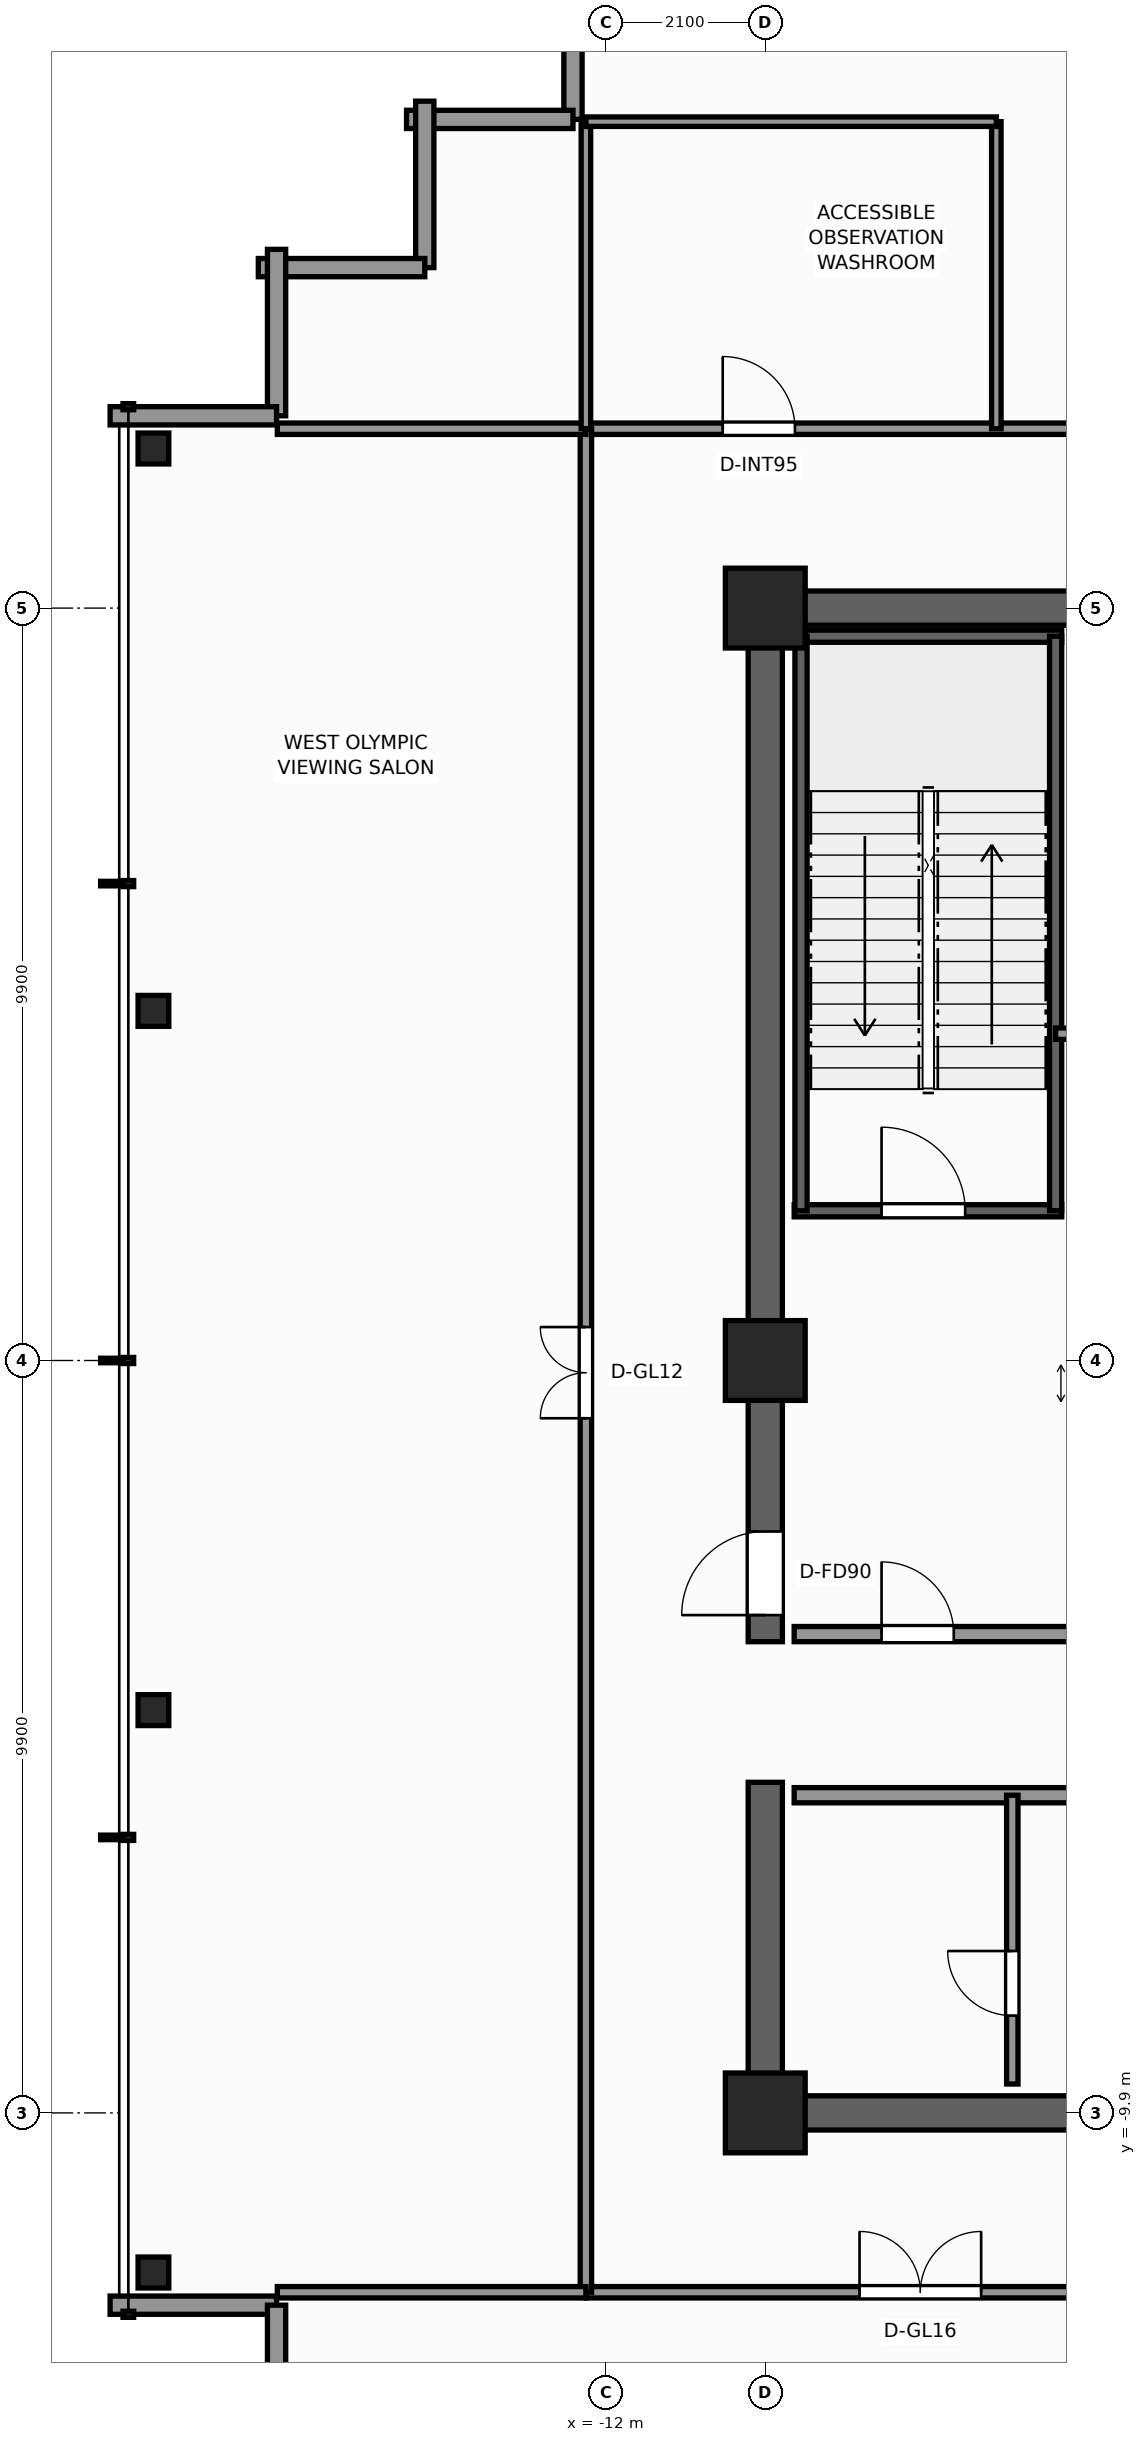
"""IFC4 building model, lengths in metres.
Left out: names, types, materials, properties, quantities, classifications, styles, units other than length and angle.
Written with IfcOpenShell. Run it as: python <this file> out.ifc"""

import sys

from ifc_helpers import new_model, si_unit, direction, frame, frame_2d, origin, origin_2d, place, context, subcontext, project, spatial, rectangle, i_section, extrude, element, fill, save


model = new_model("IFC4")
c1 = context("Model", 3, precision=1e-05, world=origin(), true_north=direction((0.0, 1.0)))
c2 = subcontext(c1, "Body", "Model", "MODEL_VIEW")
j1 = project(units=[si_unit("LENGTHUNIT", "METRE"), si_unit("PLANEANGLEUNIT", "RADIAN")], contexts=[c1])
p1 = place(None, origin())
s1 = spatial("IfcSite", under=j1, at=p1, CompositionType="ELEMENT")
p2 = place(p1, origin())
s2 = spatial("IfcBuilding", under=s1, at=p2, CompositionType="ELEMENT")
p3 = place(p2, frame((0.0, 0.0, 267.4)))
s3 = spatial("IfcBuildingStorey", under=s2, at=p3, CompositionType="ELEMENT", Elevation=267.4)
p4 = place(p3, frame((-3.54, -9.9, 0.0), z_axis=(0.0, 0.0, 1.0), x_axis=(-1.0, 0.0, 0.0)))
e1 = element("IfcWall", 1, at=p4, inside=s3, PredefinedType="SHEAR", context=c2, shape_type="SweptSolid", body=[
    extrude(rectangle(XDim=6.585, YDim=0.45, at=frame_2d((3.292, 0.0))), origin(), (0.0, 0.0, 1.0), 5.0),
])
p5 = place(p3, frame((-10.125, 9.9, 0.0), z_axis=(0.0, 0.0, 1.0), x_axis=(1.0, 0.0, 0.0)))
e2 = element("IfcWall", 2, at=p5, inside=s3, PredefinedType="SHEAR", context=c2, shape_type="SweptSolid", body=[
    extrude(rectangle(XDim=14.545, YDim=0.45, at=frame_2d((7.272, 0.0))), origin(), (0.0, 0.0, 1.0), 5.0),
])
p6 = place(p3, frame((-9.9, -9.675, 0.0), z_axis=(0.0, 0.0, 1.0), x_axis=(0.0, 1.0, 0.0)))
e3 = element("IfcWall", 3, at=p6, inside=s3, PredefinedType="SHEAR", context=c2, shape_type="SweptSolid", body=[
    extrude(rectangle(XDim=4.125, YDim=0.45, at=frame_2d((2.062, 0.0))), origin(), (0.0, 0.0, 1.0), 5.0),
])
p7 = place(p3, frame((-9.9, -3.7, 0.0), z_axis=(0.0, 0.0, 1.0), x_axis=(0.0, 1.0, 0.0)))
e4 = element("IfcWall", 4, at=p7, inside=s3, PredefinedType="SHEAR", context=c2, shape_type="SweptSolid", body=[
    extrude(rectangle(XDim=13.375, YDim=0.45, at=frame_2d((6.688, 0.0))), origin(), (0.0, 0.0, 1.0), 5.0),
])
p8 = place(p7, frame((0.35, 0.0, 0.0)))
e5 = element("IfcOpeningElement", 5, at=p8, cuts=e4, PredefinedType="OPENING", context=c2, shape_type="SweptSolid", body=[
    extrude(rectangle(XDim=1.1, YDim=2.2, at=frame_2d((0.55, 1.1))), frame((0.0, 0.235, 0.0), z_axis=(0.0, -1.0, 0.0), x_axis=(1.0, 0.0, 0.0)), (0.0, 0.0, 1.0), 0.47),
])
for number, where, z_axis, x_axis in (
    (6, (-9.9, -9.9, 0.0), (0.0, 0.0, 1.0), (1.0, 0.0, 0.0)),
    (7, (-9.9, 9.9, 0.0), (0.0, 0.0, 1.0), (1.0, 0.0, 0.0)),
    (8, (-9.9, 0.0, 0.0), (0.0, 0.0, 1.0), (1.0, 0.0, 0.0)),
):
    element("IfcColumn", number, at=place(p3, frame(where, z_axis=z_axis, x_axis=x_axis)), inside=s3, PredefinedType="COLUMN", context=c2, shape_type="SweptSolid", body=[
        extrude(rectangle(XDim=1.05, YDim=1.05, at=origin_2d()), origin(), (0.0, 0.0, 1.0), 5.0),
    ])
for number, where, z_axis, x_axis in (
    (9, (-17.95, -12.0, 0.0), (0.0, 0.0, 1.0), (1.0, 0.0, 0.0)),
    (10, (-17.95, -4.6, 0.0), (0.0, 0.0, 1.0), (1.0, 0.0, 0.0)),
    (11, (-17.95, 4.6, 0.0), (0.0, 0.0, 1.0), (1.0, 0.0, 0.0)),
    (12, (-17.95, 12.0, 0.0), (0.0, 0.0, 1.0), (1.0, 0.0, 0.0)),
):
    element("IfcColumn", number, at=place(p3, frame(where, z_axis=z_axis, x_axis=x_axis)), inside=s3, PredefinedType="COLUMN", context=c2, shape_type="SweptSolid", body=[
        extrude(i_section(OverallWidth=0.404, OverallDepth=0.407, WebThickness=0.027, FlangeThickness=0.044, FilletRadius=0.025, at=origin_2d()), origin(), (0.0, 0.0, 1.0), 5.0),
    ])
p9 = place(p3, frame((-12.43, 16.33, 0.0), z_axis=(0.0, 0.0, 1.0), x_axis=(0.0, 1.0, 0.0)))
e13 = element("IfcWall", 13, at=p9, inside=s3, PredefinedType="STANDARD", context=c2, shape_type="SweptSolid", body=[
    extrude(rectangle(XDim=2.19, YDim=0.24, at=frame_2d((1.095, 0.0))), origin(), (0.0, 0.0, 1.0), 4.083),
])
for number, where, z_axis, x_axis in (
    (14, (-14.62, 16.33, 0.0), (0.0, 0.0, 1.0), (1.0, 0.0, 0.0)),
    (15, (-14.38, 14.38, 0.0), (0.0, 0.0, 1.0), (0.0, 1.0, 0.0)),
    (16, (-16.57, 14.38, 0.0), (0.0, 0.0, 1.0), (1.0, 0.0, 0.0)),
    (17, (-16.33, 12.43, 0.0), (0.0, 0.0, 1.0), (0.0, 1.0, 0.0)),
):
    element("IfcWall", number, at=place(p3, frame(where, z_axis=z_axis, x_axis=x_axis)), inside=s3, PredefinedType="STANDARD", context=c2, shape_type="SweptSolid", body=[
        extrude(rectangle(XDim=2.19, YDim=0.24, at=frame_2d((1.095, 0.0))), origin(), (0.0, 0.0, 1.0), 4.083),
    ])
for number, where, z_axis, x_axis in (
    (18, (-18.52, 12.43, 0.0), (0.0, 0.0, 1.0), (1.0, 0.0, 0.0)),
    (19, (-16.33, -12.43, 0.0), (0.0, 0.0, 1.0), (-1.0, 0.0, 0.0)),
):
    element("IfcWall", number, at=place(p3, frame(where, z_axis=z_axis, x_axis=x_axis)), inside=s3, PredefinedType="STANDARD", context=c2, shape_type="SweptSolid", body=[
        extrude(rectangle(XDim=2.19, YDim=0.24, at=frame_2d((1.095, 0.0))), origin(), (0.0, 0.0, 1.0), 4.083),
    ])
p10 = place(p3, frame((-16.33, -14.62, 0.0), z_axis=(0.0, 0.0, 1.0), x_axis=(0.0, 1.0, 0.0)))
e20 = element("IfcWall", 20, at=p10, inside=s3, PredefinedType="STANDARD", context=c2, shape_type="SweptSolid", body=[
    extrude(rectangle(XDim=2.19, YDim=0.24, at=frame_2d((1.095, 0.0))), origin(), (0.0, 0.0, 1.0), 4.083),
])
p11 = place(p3, frame((-9.52, 1.97, 0.0), z_axis=(0.0, 0.0, 1.0), x_axis=(1.0, 0.0, 0.0)))
e21 = element("IfcWall", 21, at=p11, inside=s3, PredefinedType="SHEAR", context=c2, shape_type="SweptSolid", body=[
    extrude(rectangle(XDim=3.52, YDim=0.16, at=frame_2d((1.76, 0.0))), origin(), (0.0, 0.0, 1.0), 5.0),
])
p12 = place(p11, frame((1.15, 0.0, 0.0)))
e22 = element("IfcOpeningElement", 22, at=p12, cuts=e21, PredefinedType="OPENING", context=c2, shape_type="SweptSolid", body=[
    extrude(rectangle(XDim=1.1, YDim=2.2, at=frame_2d((0.55, 1.1))), frame((0.0, 0.09, 0.0), z_axis=(0.0, -1.0, 0.0), x_axis=(1.0, 0.0, 0.0)), (0.0, 0.0, 1.0), 0.18),
])
p13 = place(p3, frame((-9.52, 9.53, 0.0), z_axis=(0.0, 0.0, 1.0), x_axis=(1.0, 0.0, 0.0)))
e23 = element("IfcWall", 23, at=p13, inside=s3, PredefinedType="SHEAR", context=c2, shape_type="SweptSolid", body=[
    extrude(rectangle(XDim=3.52, YDim=0.16, at=frame_2d((1.76, 0.0))), origin(), (0.0, 0.0, 1.0), 5.0),
])
for number, where, z_axis, x_axis in (
    (24, (-9.43, 1.97, 0.0), (0.0, 0.0, 1.0), (0.0, 1.0, 0.0)),
    (25, (-6.08, 1.97, 0.0), (0.0, 0.0, 1.0), (0.0, 1.0, 0.0)),
):
    element("IfcWall", number, at=place(p3, frame(where, z_axis=z_axis, x_axis=x_axis)), inside=s3, PredefinedType="SHEAR", context=c2, shape_type="SweptSolid", body=[
        extrude(rectangle(XDim=7.56, YDim=0.16, at=frame_2d((3.78, 0.0))), origin(), (0.0, 0.0, 1.0), 5.0),
    ])
p14 = place(p3, frame((-9.52, -3.6, 0.0), z_axis=(0.0, 0.0, 1.0), x_axis=(1.0, 0.0, 0.0)))
e26 = element("IfcWall", 26, at=p14, inside=s3, PredefinedType="SOLIDWALL", context=c2, shape_type="SweptSolid", body=[
    extrude(rectangle(XDim=3.77, YDim=0.2, at=frame_2d((1.885, 0.0))), origin(), (0.0, 0.0, 1.0), 4.7),
])
p15 = place(p14, frame((1.15, 0.0, 0.0)))
e27 = element("IfcOpeningElement", 27, at=p15, cuts=e26, PredefinedType="OPENING", context=c2, shape_type="SweptSolid", body=[
    extrude(rectangle(XDim=0.95, YDim=2.06, at=frame_2d((0.475, 1.03))), frame((0.0, 0.11, 0.0), z_axis=(0.0, -1.0, 0.0), x_axis=(1.0, 0.0, 0.0)), (0.0, 0.0, 1.0), 0.22),
])
p16 = place(p3, frame((-6.08, 4.3, 0.0), z_axis=(0.0, 0.0, 1.0), x_axis=(1.0, 0.0, 0.0)))
e28 = element("IfcWall", 28, at=p16, inside=s3, PredefinedType="PARTITIONING", context=c2, shape_type="SweptSolid", body=[
    extrude(rectangle(XDim=6.3, YDim=0.15, at=frame_2d((3.15, 0.0))), origin(), (0.0, 0.0, 1.0), 4.7),
])
p17 = place(p16, frame((1.05, 0.0, 0.0)))
e29 = element("IfcOpeningElement", 29, at=p17, cuts=e28, PredefinedType="OPENING", context=c2, shape_type="SweptSolid", body=[
    extrude(rectangle(XDim=0.85, YDim=2.03, at=frame_2d((0.425, 1.015))), frame((0.0, 0.085, 0.0), z_axis=(0.0, -1.0, 0.0), x_axis=(1.0, 0.0, 0.0)), (0.0, 0.0, 1.0), 0.17),
])
p18 = place(p3, frame((-9.52, -5.72, 0.0), z_axis=(0.0, 0.0, 1.0), x_axis=(1.0, 0.0, 0.0)))
e30 = element("IfcWall", 30, at=p18, inside=s3, PredefinedType="SOLIDWALL", context=c2, shape_type="SweptSolid", body=[
    extrude(rectangle(XDim=5.66, YDim=0.2, at=frame_2d((2.83, 0.0))), origin(), (0.0, 0.0, 1.0), 4.7),
])
p19 = place(p18, frame((3.6, 0.0, 0.0)))
e31 = element("IfcOpeningElement", 31, at=p19, cuts=e30, PredefinedType="OPENING", context=c2, shape_type="SweptSolid", body=[
    extrude(rectangle(XDim=0.95, YDim=2.06, at=frame_2d((0.475, 1.03))), frame((0.0, 0.11, 0.0), z_axis=(0.0, -1.0, 0.0), x_axis=(1.0, 0.0, 0.0)), (0.0, 0.0, 1.0), 0.22),
])
p20 = place(p3, frame((-6.65, -9.52, 0.0), z_axis=(0.0, 0.0, 1.0), x_axis=(0.0, 1.0, 0.0)))
e32 = element("IfcWall", 32, at=p20, inside=s3, PredefinedType="PARTITIONING", context=c2, shape_type="SweptSolid", body=[
    extrude(rectangle(XDim=3.8, YDim=0.15, at=frame_2d((1.9, 0.0))), origin(), (0.0, 0.0, 1.0), 4.7),
])
p21 = place(p20, frame((0.9, 0.0, 0.0)))
e33 = element("IfcOpeningElement", 33, at=p21, cuts=e32, PredefinedType="OPENING", context=c2, shape_type="SweptSolid", body=[
    extrude(rectangle(XDim=0.85, YDim=2.03, at=frame_2d((0.425, 1.015))), frame((0.0, 0.085, 0.0), z_axis=(0.0, -1.0, 0.0), x_axis=(1.0, 0.0, 0.0)), (0.0, 0.0, 1.0), 0.17),
])
p22 = place(p3, frame((-12.26, -12.26, 0.0), z_axis=(0.0, 0.0, 1.0), x_axis=(1.0, 0.0, 0.0)))
e34 = element("IfcWall", 34, at=p22, inside=s3, PredefinedType="PARTITIONING", context=c2, shape_type="SweptSolid", body=[
    extrude(rectangle(XDim=24.52, YDim=0.15, at=frame_2d((12.26, 0.0))), origin(), (0.0, 0.0, 1.0), 3.989),
])
p23 = place(p22, frame((3.6, 0.0, 0.0)))
e35 = element("IfcOpeningElement", 35, at=p23, cuts=e34, PredefinedType="OPENING", context=c2, shape_type="SweptSolid", body=[
    extrude(rectangle(XDim=1.6, YDim=2.3, at=frame_2d((0.8, 1.15))), frame((0.0, 0.085, 0.0), z_axis=(0.0, -1.0, 0.0), x_axis=(1.0, 0.0, 0.0)), (0.0, 0.0, 1.0), 0.17),
])
p24 = place(p22, frame((12.26, 0.0, 0.0)))
e36 = element("IfcOpeningElement", 36, at=p24, cuts=e34, PredefinedType="OPENING", context=c2, shape_type="SweptSolid", body=[
    extrude(rectangle(XDim=1.2, YDim=2.2, at=frame_2d((0.6, 1.1))), frame((0.0, 0.085, 0.0), z_axis=(0.0, -1.0, 0.0), x_axis=(1.0, 0.0, 0.0)), (0.0, 0.0, 1.0), 0.17),
])
p25 = place(p3, frame((-12.26, 12.26, 0.0), z_axis=(0.0, 0.0, 1.0), x_axis=(1.0, 0.0, 0.0)))
e37 = element("IfcWall", 37, at=p25, inside=s3, PredefinedType="PARTITIONING", context=c2, shape_type="SweptSolid", body=[
    extrude(rectangle(XDim=24.52, YDim=0.15, at=frame_2d((12.26, 0.0))), origin(), (0.0, 0.0, 1.0), 3.989),
])
p26 = place(p25, frame((1.8, 0.0, 0.0)))
e38 = element("IfcOpeningElement", 38, at=p26, cuts=e37, PredefinedType="OPENING", context=c2, shape_type="SweptSolid", body=[
    extrude(rectangle(XDim=0.95, YDim=2.06, at=frame_2d((0.475, 1.03))), frame((0.0, 0.085, 0.0), z_axis=(0.0, -1.0, 0.0), x_axis=(1.0, 0.0, 0.0)), (0.0, 0.0, 1.0), 0.17),
])
p27 = place(p25, frame((10.5, 0.0, 0.0)))
e39 = element("IfcOpeningElement", 39, at=p27, cuts=e37, PredefinedType="OPENING", context=c2, shape_type="SweptSolid", body=[
    extrude(rectangle(XDim=1.6, YDim=2.3, at=frame_2d((0.8, 1.15))), frame((0.0, 0.085, 0.0), z_axis=(0.0, -1.0, 0.0), x_axis=(1.0, 0.0, 0.0)), (0.0, 0.0, 1.0), 0.17),
])
p28 = place(p3, frame((-12.26, -12.26, 0.0), z_axis=(0.0, 0.0, 1.0), x_axis=(0.0, 1.0, 0.0)))
e40 = element("IfcWall", 40, at=p28, inside=s3, PredefinedType="PARTITIONING", context=c2, shape_type="SweptSolid", body=[
    extrude(rectangle(XDim=24.52, YDim=0.15, at=frame_2d((12.26, 0.0))), origin(), (0.0, 0.0, 1.0), 3.989),
])
p29 = place(p28, frame((11.5, 0.0, 0.0)))
e41 = element("IfcOpeningElement", 41, at=p29, cuts=e40, PredefinedType="OPENING", context=c2, shape_type="SweptSolid", body=[
    extrude(rectangle(XDim=1.2, YDim=2.2, at=frame_2d((0.6, 1.1))), frame((0.0, 0.085, 0.0), z_axis=(0.0, -1.0, 0.0), x_axis=(1.0, 0.0, 0.0)), (0.0, 0.0, 1.0), 0.17),
])
for number, where, z_axis, x_axis in (
    (42, (-16.32, -12.26, 0.0), (0.0, 0.0, 1.0), (1.0, 0.0, 0.0)),
    (43, (-16.32, 12.26, 0.0), (0.0, 0.0, 1.0), (1.0, 0.0, 0.0)),
):
    element("IfcWall", number, at=place(p3, frame(where, z_axis=z_axis, x_axis=x_axis)), inside=s3, PredefinedType="PARTITIONING", context=c2, shape_type="SweptSolid", body=[
        extrude(rectangle(XDim=4.06, YDim=0.15, at=frame_2d((2.03, 0.0))), origin(), (0.0, 0.0, 1.0), 4.7),
    ])
for number, where, z_axis, x_axis in (
    (44, (-12.26, 12.26, 0.0), (0.0, 0.0, 1.0), (0.0, 1.0, 0.0)),
    (45, (-6.86, 12.26, 0.0), (0.0, 0.0, 1.0), (0.0, 1.0, 0.0)),
):
    element("IfcWall", number, at=place(p3, frame(where, z_axis=z_axis, x_axis=x_axis)), inside=s3, PredefinedType="PARTITIONING", context=c2, shape_type="SweptSolid", body=[
        extrude(rectangle(XDim=4.04, YDim=0.125, at=frame_2d((2.02, 0.0))), origin(), (0.0, 0.0, 1.0), 4.7),
    ])
p30 = place(p3, frame((-12.26, 16.3, 0.0), z_axis=(0.0, 0.0, 1.0), x_axis=(1.0, 0.0, 0.0)))
e46 = element("IfcWall", 46, at=p30, inside=s3, PredefinedType="PARTITIONING", context=c2, shape_type="SweptSolid", body=[
    extrude(rectangle(XDim=5.4, YDim=0.125, at=frame_2d((2.7, 0.0))), origin(), (0.0, 0.0, 1.0), 3.989),
])
p31 = place(p12, origin())
e47 = element("IfcDoor", 47, at=p31, inside=s3, OperationType="SINGLE_SWING_LEFT", PredefinedType="DOOR", context=c2, shape_type="SweptSolid", body=[
    extrude(rectangle(XDim=1.1, YDim=2.2, at=frame_2d((0.55, 1.1))), frame((0.0, 0.025, 0.0), z_axis=(0.0, -1.0, 0.0), x_axis=(1.0, 0.0, 0.0)), (0.0, 0.0, 1.0), 0.05),
])
fill(e22, e47)
p32 = place(p8, origin())
e48 = element("IfcDoor", 48, at=p32, inside=s3, OperationType="SINGLE_SWING_LEFT", PredefinedType="DOOR", context=c2, shape_type="SweptSolid", body=[
    extrude(rectangle(XDim=1.1, YDim=2.2, at=frame_2d((0.55, 1.1))), frame((0.0, 0.025, 0.0), z_axis=(0.0, -1.0, 0.0), x_axis=(1.0, 0.0, 0.0)), (0.0, 0.0, 1.0), 0.05),
])
fill(e5, e48)
p33 = place(p21, origin())
e49 = element("IfcDoor", 49, at=p33, inside=s3, OperationType="SINGLE_SWING_RIGHT", PredefinedType="DOOR", context=c2, shape_type="SweptSolid", body=[
    extrude(rectangle(XDim=0.85, YDim=2.03, at=frame_2d((0.425, 1.015))), frame((0.0, 0.025, 0.0), z_axis=(0.0, -1.0, 0.0), x_axis=(1.0, 0.0, 0.0)), (0.0, 0.0, 1.0), 0.05),
])
fill(e33, e49)
p34 = place(p15, origin())
e50 = element("IfcDoor", 50, at=p34, inside=s3, OperationType="SINGLE_SWING_LEFT", PredefinedType="DOOR", context=c2, shape_type="SweptSolid", body=[
    extrude(rectangle(XDim=0.95, YDim=2.06, at=frame_2d((0.475, 1.03))), frame((0.0, 0.025, 0.0), z_axis=(0.0, -1.0, 0.0), x_axis=(1.0, 0.0, 0.0)), (0.0, 0.0, 1.0), 0.05),
])
fill(e27, e50)
p35 = place(p23, origin())
e51 = element("IfcDoor", 51, at=p35, inside=s3, OperationType="DOUBLE_DOOR_SINGLE_SWING", PredefinedType="DOOR", context=c2, shape_type="SweptSolid", body=[
    extrude(rectangle(XDim=1.6, YDim=2.3, at=frame_2d((0.8, 1.15))), frame((0.0, 0.025, 0.0), z_axis=(0.0, -1.0, 0.0), x_axis=(1.0, 0.0, 0.0)), (0.0, 0.0, 1.0), 0.05),
])
fill(e35, e51)
p36 = place(p29, origin())
e52 = element("IfcDoor", 52, at=p36, inside=s3, OperationType="DOUBLE_DOOR_SINGLE_SWING", PredefinedType="DOOR", context=c2, shape_type="SweptSolid", body=[
    extrude(rectangle(XDim=1.2, YDim=2.2, at=frame_2d((0.6, 1.1))), frame((0.0, 0.025, 0.0), z_axis=(0.0, -1.0, 0.0), x_axis=(1.0, 0.0, 0.0)), (0.0, 0.0, 1.0), 0.05),
])
fill(e41, e52)
p37 = place(p26, origin())
e53 = element("IfcDoor", 53, at=p37, inside=s3, OperationType="SINGLE_SWING_LEFT", PredefinedType="DOOR", context=c2, shape_type="SweptSolid", body=[
    extrude(rectangle(XDim=0.95, YDim=2.06, at=frame_2d((0.475, 1.03))), frame((0.0, 0.025, 0.0), z_axis=(0.0, -1.0, 0.0), x_axis=(1.0, 0.0, 0.0)), (0.0, 0.0, 1.0), 0.05),
])
fill(e38, e53)
save(model, sys.argv[1])
